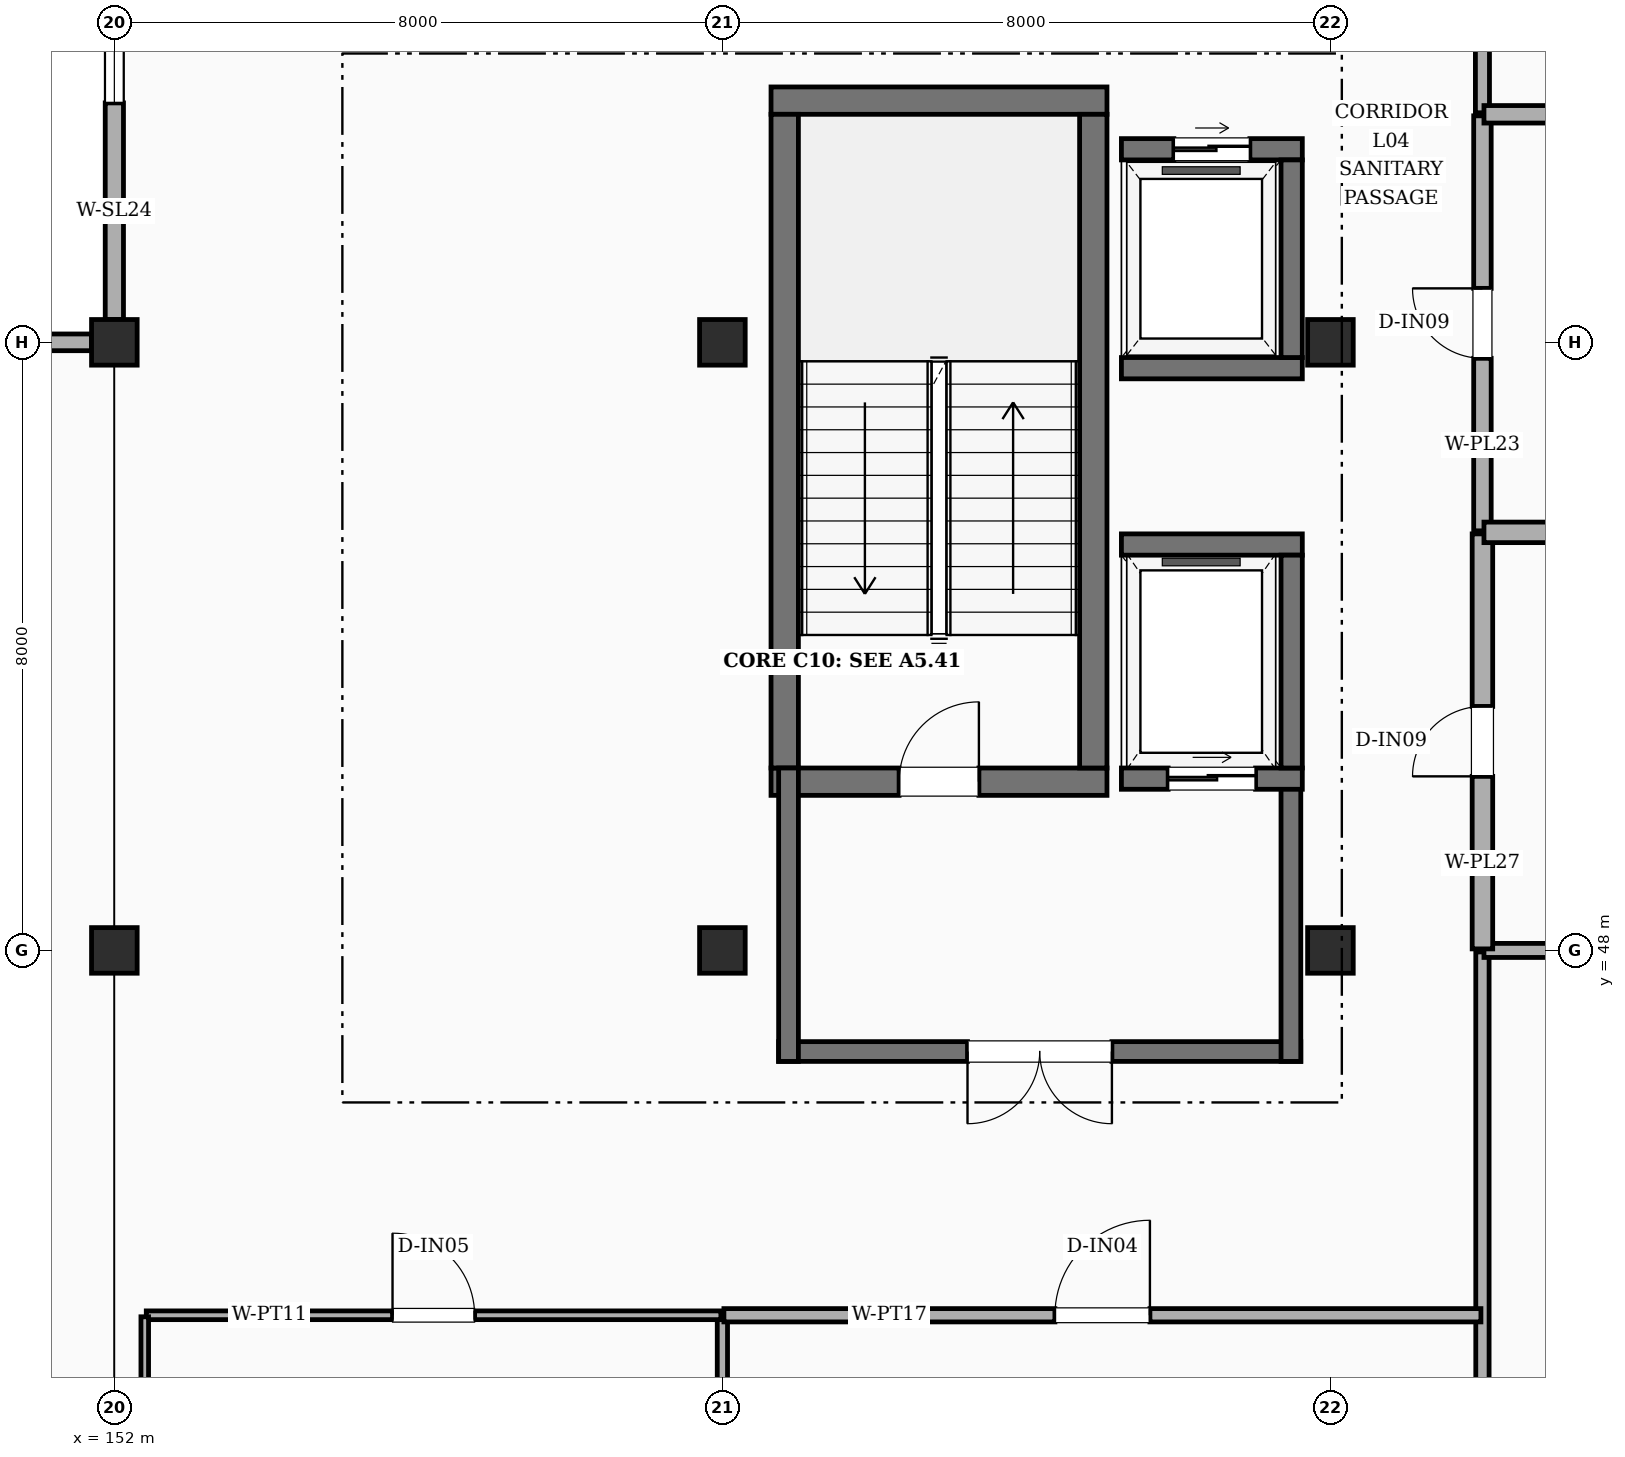
"""IFC4 building model, lengths in metres.
Left out: names, types, materials, properties, quantities, classifications, styles, units other than length and angle.
Written with IfcOpenShell. Run it as: python <this file> out.ifc"""

import sys

from ifc_helpers import new_model, si_unit, direction, frame, frame_2d, origin, origin_2d, place, context, subcontext, project, spatial, rectangle, extrude, element, fill, save


model = new_model("IFC4")
c1 = context("Model", 3, precision=1e-05, world=origin(), true_north=direction((0.0, 1.0)))
c2 = subcontext(c1, "Body", "Model", "MODEL_VIEW")
j1 = project(units=[si_unit("LENGTHUNIT", "METRE"), si_unit("PLANEANGLEUNIT", "RADIAN")], contexts=[c1])
p1 = place(None, origin())
s1 = spatial("IfcSite", under=j1, at=p1, CompositionType="ELEMENT")
p2 = place(p1, origin())
s2 = spatial("IfcBuilding", under=s1, at=p2, CompositionType="ELEMENT")
p3 = place(p2, frame((0.0, 0.0, 19.2)))
s3 = spatial("IfcBuildingStorey", under=s2, at=p3, CompositionType="ELEMENT", Elevation=19.2)
for number, where, z_axis, x_axis in (
    (1, (152.0, 48.0, 0.0), (0.0, 0.0, 1.0), (1.0, 0.0, 0.0)),
    (2, (152.0, 56.0, 0.0), (0.0, 0.0, 1.0), (1.0, 0.0, 0.0)),
    (3, (160.0, 48.0, 0.0), (0.0, 0.0, 1.0), (1.0, 0.0, 0.0)),
    (4, (160.0, 56.0, 0.0), (0.0, 0.0, 1.0), (1.0, 0.0, 0.0)),
    (5, (168.0, 48.0, 0.0), (0.0, 0.0, 1.0), (1.0, 0.0, 0.0)),
    (6, (168.0, 56.0, 0.0), (0.0, 0.0, 1.0), (1.0, 0.0, 0.0)),
):
    element("IfcColumn", number, at=place(p3, frame(where, z_axis=z_axis, x_axis=x_axis)), inside=s3, PredefinedType="COLUMN", context=c2, shape_type="SweptSolid", body=[
        extrude(rectangle(XDim=0.6, YDim=0.6, at=origin_2d()), origin(), (0.0, 0.0, 1.0), 4.2),
    ])
p4 = place(p3, frame((152.0, 63.7, 0.0), z_axis=(0.0, 0.0, 1.0), x_axis=(0.0, -1.0, 0.0)))
e7 = element("IfcWall", 7, at=p4, inside=s3, PredefinedType="SOLIDWALL", context=c2, shape_type="SweptSolid", body=[
    extrude(rectangle(XDim=7.4, YDim=0.24, at=frame_2d((3.7, 0.0))), origin(), (0.0, 0.0, 1.0), 3.37),
])
p5 = place(p4, frame((2.85, 0.0, 0.95)))
e8 = element("IfcOpeningElement", 8, at=p5, cuts=e7, PredefinedType="OPENING", context=c2, shape_type="SweptSolid", body=[
    extrude(rectangle(XDim=1.7, YDim=1.65, at=frame_2d((0.85, 0.825))), frame((0.0, 0.13, 0.0), z_axis=(0.0, -1.0, 0.0), x_axis=(1.0, 0.0, 0.0)), (0.0, 0.0, 1.0), 0.26),
])
p6 = place(p3, frame((151.7, 56.0, 0.0), z_axis=(0.0, 0.0, 1.0), x_axis=(-1.0, 0.0, 0.0)))
e9 = element("IfcWall", 9, at=p6, inside=s3, PredefinedType="SOLIDWALL", context=c2, shape_type="SweptSolid", body=[
    extrude(rectangle(XDim=7.4, YDim=0.22, at=frame_2d((3.7, 0.0))), origin(), (0.0, 0.0, 1.0), 3.96),
])
p7 = place(p6, frame((2.525, 0.0, 0.95)))
e10 = element("IfcOpeningElement", 10, at=p7, cuts=e9, PredefinedType="OPENING", context=c2, shape_type="SweptSolid", body=[
    extrude(rectangle(XDim=2.35, YDim=1.65, at=frame_2d((1.175, 0.825))), frame((0.0, 0.12, 0.0), z_axis=(0.0, -1.0, 0.0), x_axis=(1.0, 0.0, 0.0)), (0.0, 0.0, 1.0), 0.24),
])
p8 = place(p3, frame((160.64, 50.22, 0.0), z_axis=(0.0, 0.0, 1.0), x_axis=(1.0, 0.0, 0.0)))
e11 = element("IfcWall", 11, at=p8, inside=s3, PredefinedType="SHEAR", context=c2, shape_type="SweptSolid", body=[
    extrude(rectangle(XDim=4.42, YDim=0.36, at=frame_2d((2.21, 0.0))), origin(), (0.0, 0.0, 1.0), 4.2),
])
p9 = place(p8, frame((1.685, 0.0, 0.0)))
e12 = element("IfcOpeningElement", 12, at=p9, cuts=e11, PredefinedType="OPENING", context=c2, shape_type="SweptSolid", body=[
    extrude(rectangle(XDim=1.05, YDim=2.15, at=frame_2d((0.525, 1.075))), frame((0.0, 0.19, 0.0), z_axis=(0.0, -1.0, 0.0), x_axis=(1.0, 0.0, 0.0)), (0.0, 0.0, 1.0), 0.38),
])
p10 = place(p3, frame((160.64, 59.18, 0.0), z_axis=(0.0, 0.0, 1.0), x_axis=(1.0, 0.0, 0.0)))
e13 = element("IfcWall", 13, at=p10, inside=s3, PredefinedType="SHEAR", context=c2, shape_type="SweptSolid", body=[
    extrude(rectangle(XDim=4.42, YDim=0.36, at=frame_2d((2.21, 0.0))), origin(), (0.0, 0.0, 1.0), 4.2),
])
for number, where, z_axis, x_axis in (
    (14, (160.82, 50.4, 0.0), (0.0, 0.0, 1.0), (0.0, 1.0, 0.0)),
    (15, (164.88, 50.4, 0.0), (0.0, 0.0, 1.0), (0.0, 1.0, 0.0)),
):
    element("IfcWall", number, at=place(p3, frame(where, z_axis=z_axis, x_axis=x_axis)), inside=s3, PredefinedType="SHEAR", context=c2, shape_type="SweptSolid", body=[
        extrude(rectangle(XDim=8.6, YDim=0.36, at=frame_2d((4.3, 0.0))), origin(), (0.0, 0.0, 1.0), 4.2),
    ])
p11 = place(p3, frame((167.61, 46.67, 0.0), z_axis=(0.0, 0.0, 1.0), x_axis=(-1.0, 0.0, 0.0)))
e16 = element("IfcWall", 16, at=p11, inside=s3, PredefinedType="SHEAR", context=c2, shape_type="SweptSolid", body=[
    extrude(rectangle(XDim=6.87, YDim=0.26, at=frame_2d((3.435, 0.0))), origin(), (0.0, 0.0, 1.0), 4.2),
])
p12 = place(p11, frame((2.485, 0.0, 0.0)))
e17 = element("IfcOpeningElement", 17, at=p12, cuts=e16, PredefinedType="OPENING", context=c2, shape_type="SweptSolid", body=[
    extrude(rectangle(XDim=1.9, YDim=2.25, at=frame_2d((0.95, 1.125))), frame((0.0, 0.14, 0.0), z_axis=(0.0, -1.0, 0.0), x_axis=(1.0, 0.0, 0.0)), (0.0, 0.0, 1.0), 0.28),
])
for number, where, z_axis, x_axis in (
    (18, (160.87, 46.54, 0.0), (0.0, 0.0, 1.0), (0.0, 1.0, 0.0)),
    (19, (167.48, 46.54, 0.0), (0.0, 0.0, 1.0), (0.0, 1.0, 0.0)),
):
    element("IfcWall", number, at=place(p3, frame(where, z_axis=z_axis, x_axis=x_axis)), inside=s3, PredefinedType="SHEAR", context=c2, shape_type="SweptSolid", body=[
        extrude(rectangle(XDim=3.86, YDim=0.26, at=frame_2d((1.93, 0.0))), origin(), (0.0, 0.0, 1.0), 4.2),
    ])
p13 = place(p3, frame((165.25, 50.26, 0.0), z_axis=(0.0, 0.0, 1.0), x_axis=(1.0, 0.0, 0.0)))
e20 = element("IfcWall", 20, at=p13, inside=s3, PredefinedType="SHEAR", context=c2, shape_type="SweptSolid", body=[
    extrude(rectangle(XDim=2.38, YDim=0.28, at=frame_2d((1.19, 0.0))), origin(), (0.0, 0.0, 1.0), 4.2),
])
p14 = place(p13, frame((0.615, 0.0, 0.0)))
e21 = element("IfcOpeningElement", 21, at=p14, cuts=e20, PredefinedType="OPENING", context=c2, shape_type="SweptSolid", body=[
    extrude(rectangle(XDim=1.15, YDim=2.2, at=frame_2d((0.575, 1.1))), frame((0.0, 0.15, 0.0), z_axis=(0.0, -1.0, 0.0), x_axis=(1.0, 0.0, 0.0)), (0.0, 0.0, 1.0), 0.3),
])
p15 = place(p3, frame((165.25, 53.34, 0.0), z_axis=(0.0, 0.0, 1.0), x_axis=(1.0, 0.0, 0.0)))
e22 = element("IfcWall", 22, at=p15, inside=s3, PredefinedType="SHEAR", context=c2, shape_type="SweptSolid", body=[
    extrude(rectangle(XDim=2.38, YDim=0.28, at=frame_2d((1.19, 0.0))), origin(), (0.0, 0.0, 1.0), 4.2),
])
p16 = place(p3, frame((167.49, 50.4, 0.0), z_axis=(0.0, 0.0, 1.0), x_axis=(0.0, 1.0, 0.0)))
e23 = element("IfcWall", 23, at=p16, inside=s3, PredefinedType="SHEAR", context=c2, shape_type="SweptSolid", body=[
    extrude(rectangle(XDim=2.8, YDim=0.28, at=frame_2d((1.4, 0.0))), origin(), (0.0, 0.0, 1.0), 4.2),
])
p17 = place(p3, frame((165.25, 55.66, 0.0), z_axis=(0.0, 0.0, 1.0), x_axis=(1.0, 0.0, 0.0)))
e24 = element("IfcWall", 24, at=p17, inside=s3, PredefinedType="SHEAR", context=c2, shape_type="SweptSolid", body=[
    extrude(rectangle(XDim=2.38, YDim=0.28, at=frame_2d((1.19, 0.0))), origin(), (0.0, 0.0, 1.0), 4.2),
])
p18 = place(p3, frame((165.25, 58.54, 0.0), z_axis=(0.0, 0.0, 1.0), x_axis=(1.0, 0.0, 0.0)))
e25 = element("IfcWall", 25, at=p18, inside=s3, PredefinedType="SHEAR", context=c2, shape_type="SweptSolid", body=[
    extrude(rectangle(XDim=2.38, YDim=0.28, at=frame_2d((1.19, 0.0))), origin(), (0.0, 0.0, 1.0), 4.2),
])
p19 = place(p18, frame((0.69, 0.0, 0.0)))
e26 = element("IfcOpeningElement", 26, at=p19, cuts=e25, PredefinedType="OPENING", context=c2, shape_type="SweptSolid", body=[
    extrude(rectangle(XDim=1.0, YDim=2.15, at=frame_2d((0.5, 1.075))), frame((0.0, 0.15, 0.0), z_axis=(0.0, -1.0, 0.0), x_axis=(1.0, 0.0, 0.0)), (0.0, 0.0, 1.0), 0.3),
])
p20 = place(p3, frame((167.49, 55.8, 0.0), z_axis=(0.0, 0.0, 1.0), x_axis=(0.0, 1.0, 0.0)))
e27 = element("IfcWall", 27, at=p20, inside=s3, PredefinedType="SHEAR", context=c2, shape_type="SweptSolid", body=[
    extrude(rectangle(XDim=2.6, YDim=0.28, at=frame_2d((1.3, 0.0))), origin(), (0.0, 0.0, 1.0), 4.2),
])
p21 = place(p3, frame((160.0, 24.02, 0.0), z_axis=(0.0, 0.0, 1.0), x_axis=(0.0, 1.0, 0.0)))
e28 = element("IfcWall", 28, at=p21, inside=s3, PredefinedType="PARTITIONING", context=c2, shape_type="SweptSolid", body=[
    extrude(rectangle(XDim=19.16, YDim=0.135, at=frame_2d((9.58, 0.0))), origin(), (0.0, 0.0, 1.0), 3.37),
])
p22 = place(p3, frame((152.42, 43.2, 0.0), z_axis=(0.0, 0.0, 1.0), x_axis=(1.0, 0.0, 0.0)))
e29 = element("IfcWall", 29, at=p22, inside=s3, PredefinedType="PARTITIONING", context=c2, shape_type="SweptSolid", body=[
    extrude(rectangle(XDim=7.56, YDim=0.115, at=frame_2d((3.78, 0.0))), origin(), (0.0, 0.0, 1.0), 3.37),
])
p23 = place(p22, frame((3.24, 0.0, 0.0)))
e30 = element("IfcOpeningElement", 30, at=p23, cuts=e29, PredefinedType="OPENING", context=c2, shape_type="SweptSolid", body=[
    extrude(rectangle(XDim=1.08, YDim=2.15, at=frame_2d((0.54, 1.075))), frame((0.0, 0.067, 0.0), z_axis=(0.0, -1.0, 0.0), x_axis=(1.0, 0.0, 0.0)), (0.0, 0.0, 1.0), 0.135),
])
p24 = place(p3, frame((152.4, 38.02, 0.0), z_axis=(0.0, 0.0, 1.0), x_axis=(0.0, 1.0, 0.0)))
e31 = element("IfcWall", 31, at=p24, inside=s3, PredefinedType="PARTITIONING", context=c2, shape_type="SweptSolid", body=[
    extrude(rectangle(XDim=5.16, YDim=0.1, at=frame_2d((2.58, 0.0))), origin(), (0.0, 0.0, 1.0), 3.37),
])
p25 = place(p3, frame((170.0, 24.02, 0.0), z_axis=(0.0, 0.0, 1.0), x_axis=(0.0, 1.0, 0.0)))
e32 = element("IfcWall", 32, at=p25, inside=s3, PredefinedType="PARTITIONING", context=c2, shape_type="SweptSolid", body=[
    extrude(rectangle(XDim=23.96, YDim=0.175, at=frame_2d((11.98, 0.0))), origin(), (0.0, 0.0, 1.0), 3.37),
])
p26 = place(p25, frame((11.44, 0.0, 0.0)))
e33 = element("IfcOpeningElement", 33, at=p26, cuts=e32, PredefinedType="OPENING", context=c2, shape_type="SweptSolid", body=[
    extrude(rectangle(XDim=1.08, YDim=2.15, at=frame_2d((0.54, 1.075))), frame((0.0, 0.097, 0.0), z_axis=(0.0, -1.0, 0.0), x_axis=(1.0, 0.0, 0.0)), (0.0, 0.0, 1.0), 0.195),
])
p27 = place(p3, frame((170.02, 48.0, 0.0), z_axis=(0.0, 0.0, 1.0), x_axis=(1.0, 0.0, 0.0)))
e34 = element("IfcWall", 34, at=p27, inside=s3, PredefinedType="PLUMBINGWALL", context=c2, shape_type="SweptSolid", body=[
    extrude(rectangle(XDim=5.86, YDim=0.185, at=frame_2d((2.93, 0.0))), origin(), (0.0, 0.0, 1.0), 3.37),
])
p28 = place(p3, frame((170.0, 48.02, 0.0), z_axis=(0.0, 0.0, 1.0), x_axis=(0.0, 1.0, 0.0)))
e35 = element("IfcWall", 35, at=p28, inside=s3, PredefinedType="PLUMBINGWALL", context=c2, shape_type="SweptSolid", body=[
    extrude(rectangle(XDim=5.46, YDim=0.27, at=frame_2d((2.73, 0.0))), origin(), (0.0, 0.0, 1.0), 3.37),
])
p29 = place(p28, frame((2.27, 0.0, 0.0)))
e36 = element("IfcOpeningElement", 36, at=p29, cuts=e35, PredefinedType="OPENING", context=c2, shape_type="SweptSolid", body=[
    extrude(rectangle(XDim=0.92, YDim=2.1, at=frame_2d((0.46, 1.05))), frame((0.0, 0.145, 0.0), z_axis=(0.0, -1.0, 0.0), x_axis=(1.0, 0.0, 0.0)), (0.0, 0.0, 1.0), 0.29),
])
p30 = place(p3, frame((170.0, 53.52, 0.0), z_axis=(0.0, 0.0, 1.0), x_axis=(0.0, 1.0, 0.0)))
e37 = element("IfcWall", 37, at=p30, inside=s3, PredefinedType="PLUMBINGWALL", context=c2, shape_type="SweptSolid", body=[
    extrude(rectangle(XDim=5.46, YDim=0.23, at=frame_2d((2.73, 0.0))), origin(), (0.0, 0.0, 1.0), 3.37),
])
p31 = place(p30, frame((2.27, 0.0, 0.0)))
e38 = element("IfcOpeningElement", 38, at=p31, cuts=e37, PredefinedType="OPENING", context=c2, shape_type="SweptSolid", body=[
    extrude(rectangle(XDim=0.92, YDim=2.1, at=frame_2d((0.46, 1.05))), frame((0.0, 0.125, 0.0), z_axis=(0.0, -1.0, 0.0), x_axis=(1.0, 0.0, 0.0)), (0.0, 0.0, 1.0), 0.25),
])
p32 = place(p3, frame((170.0, 59.02, 0.0), z_axis=(0.0, 0.0, 1.0), x_axis=(0.0, 1.0, 0.0)))
e39 = element("IfcWall", 39, at=p32, inside=s3, PredefinedType="PLUMBINGWALL", context=c2, shape_type="SweptSolid", body=[
    extrude(rectangle(XDim=4.86, YDim=0.185, at=frame_2d((2.43, 0.0))), origin(), (0.0, 0.0, 1.0), 3.37),
])
p33 = place(p32, frame((1.95, 0.0, 0.0)))
e40 = element("IfcOpeningElement", 40, at=p33, cuts=e39, PredefinedType="OPENING", context=c2, shape_type="SweptSolid", body=[
    extrude(rectangle(XDim=0.96, YDim=2.1, at=frame_2d((0.48, 1.05))), frame((0.0, 0.103, 0.0), z_axis=(0.0, -1.0, 0.0), x_axis=(1.0, 0.0, 0.0)), (0.0, 0.0, 1.0), 0.205),
])
p34 = place(p3, frame((170.02, 53.5, 0.0), z_axis=(0.0, 0.0, 1.0), x_axis=(1.0, 0.0, 0.0)))
e41 = element("IfcWall", 41, at=p34, inside=s3, PredefinedType="PLUMBINGWALL", context=c2, shape_type="SweptSolid", body=[
    extrude(rectangle(XDim=5.86, YDim=0.27, at=frame_2d((2.93, 0.0))), origin(), (0.0, 0.0, 1.0), 3.57),
])
p35 = place(p3, frame((170.02, 59.0, 0.0), z_axis=(0.0, 0.0, 1.0), x_axis=(1.0, 0.0, 0.0)))
e42 = element("IfcWall", 42, at=p35, inside=s3, PredefinedType="PLUMBINGWALL", context=c2, shape_type="SweptSolid", body=[
    extrude(rectangle(XDim=5.86, YDim=0.23, at=frame_2d((2.93, 0.0))), origin(), (0.0, 0.0, 1.0), 3.57),
])
p36 = place(p3, frame((160.02, 43.2, 0.0), z_axis=(0.0, 0.0, 1.0), x_axis=(1.0, 0.0, 0.0)))
e43 = element("IfcWall", 43, at=p36, inside=s3, PredefinedType="PARTITIONING", context=c2, shape_type="SweptSolid", body=[
    extrude(rectangle(XDim=9.96, YDim=0.175, at=frame_2d((4.98, 0.0))), origin(), (0.0, 0.0, 1.0), 3.37),
])
p37 = place(p36, frame((4.355, 0.0, 0.0)))
e44 = element("IfcOpeningElement", 44, at=p37, cuts=e43, PredefinedType="OPENING", context=c2, shape_type="SweptSolid", body=[
    extrude(rectangle(XDim=1.25, YDim=2.15, at=frame_2d((0.625, 1.075))), frame((0.0, 0.097, 0.0), z_axis=(0.0, -1.0, 0.0), x_axis=(1.0, 0.0, 0.0)), (0.0, 0.0, 1.0), 0.195),
])
p38 = place(p5, origin())
e45 = element("IfcWindow", 45, at=p38, inside=s3, PartitioningType="SINGLE_PANEL", PredefinedType="WINDOW", context=c2, shape_type="SweptSolid", body=[
    extrude(rectangle(XDim=1.7, YDim=1.65, at=frame_2d((0.85, 0.825))), frame((0.0, 0.03, 0.0), z_axis=(0.0, -1.0, 0.0), x_axis=(1.0, 0.0, 0.0)), (0.0, 0.0, 1.0), 0.06),
])
fill(e8, e45)
p39 = place(p9, origin())
e46 = element("IfcDoor", 46, at=p39, inside=s3, OperationType="SINGLE_SWING_RIGHT", PredefinedType="DOOR", context=c2, shape_type="SweptSolid", body=[
    extrude(rectangle(XDim=1.05, YDim=2.15, at=frame_2d((0.525, 1.075))), frame((0.0, 0.025, 0.0), z_axis=(0.0, -1.0, 0.0), x_axis=(1.0, 0.0, 0.0)), (0.0, 0.0, 1.0), 0.05),
])
fill(e12, e46)
p40 = place(p12, origin())
e47 = element("IfcDoor", 47, at=p40, inside=s3, OperationType="DOUBLE_DOOR_SINGLE_SWING", PredefinedType="DOOR", context=c2, shape_type="SweptSolid", body=[
    extrude(rectangle(XDim=1.9, YDim=2.25, at=frame_2d((0.95, 1.125))), frame((0.0, 0.025, 0.0), z_axis=(0.0, -1.0, 0.0), x_axis=(1.0, 0.0, 0.0)), (0.0, 0.0, 1.0), 0.05),
])
fill(e17, e47)
p41 = place(p14, origin())
e48 = element("IfcDoor", 48, at=p41, inside=s3, OperationType="SLIDING_TO_LEFT", PredefinedType="DOOR", context=c2, shape_type="SweptSolid", body=[
    extrude(rectangle(XDim=1.15, YDim=2.2, at=frame_2d((0.575, 1.1))), frame((0.0, 0.025, 0.0), z_axis=(0.0, -1.0, 0.0), x_axis=(1.0, 0.0, 0.0)), (0.0, 0.0, 1.0), 0.05),
])
fill(e21, e48)
p42 = place(p19, origin())
e49 = element("IfcDoor", 49, at=p42, inside=s3, OperationType="SLIDING_TO_LEFT", PredefinedType="DOOR", context=c2, shape_type="SweptSolid", body=[
    extrude(rectangle(XDim=1.0, YDim=2.15, at=frame_2d((0.5, 1.075))), frame((0.0, 0.025, 0.0), z_axis=(0.0, -1.0, 0.0), x_axis=(1.0, 0.0, 0.0)), (0.0, 0.0, 1.0), 0.05),
])
fill(e26, e49)
p43 = place(p23, origin())
e50 = element("IfcDoor", 50, at=p43, inside=s3, OperationType="SINGLE_SWING_LEFT", PredefinedType="DOOR", context=c2, shape_type="SweptSolid", body=[
    extrude(rectangle(XDim=1.08, YDim=2.15, at=frame_2d((0.54, 1.075))), frame((0.0, 0.025, 0.0), z_axis=(0.0, -1.0, 0.0), x_axis=(1.0, 0.0, 0.0)), (0.0, 0.0, 1.0), 0.05),
])
fill(e30, e50)
p44 = place(p29, origin())
e51 = element("IfcDoor", 51, at=p44, inside=s3, OperationType="SINGLE_SWING_LEFT", PredefinedType="DOOR", context=c2, shape_type="SweptSolid", body=[
    extrude(rectangle(XDim=0.92, YDim=2.1, at=frame_2d((0.46, 1.05))), frame((0.0, 0.025, 0.0), z_axis=(0.0, -1.0, 0.0), x_axis=(1.0, 0.0, 0.0)), (0.0, 0.0, 1.0), 0.05),
])
fill(e36, e51)
p45 = place(p31, origin())
e52 = element("IfcDoor", 52, at=p45, inside=s3, OperationType="SINGLE_SWING_RIGHT", PredefinedType="DOOR", context=c2, shape_type="SweptSolid", body=[
    extrude(rectangle(XDim=0.92, YDim=2.1, at=frame_2d((0.46, 1.05))), frame((0.0, 0.025, 0.0), z_axis=(0.0, -1.0, 0.0), x_axis=(1.0, 0.0, 0.0)), (0.0, 0.0, 1.0), 0.05),
])
fill(e38, e52)
p46 = place(p37, origin())
e53 = element("IfcDoor", 53, at=p46, inside=s3, OperationType="SINGLE_SWING_RIGHT", PredefinedType="DOOR", context=c2, shape_type="SweptSolid", body=[
    extrude(rectangle(XDim=1.25, YDim=2.15, at=frame_2d((0.625, 1.075))), frame((0.0, 0.025, 0.0), z_axis=(0.0, -1.0, 0.0), x_axis=(1.0, 0.0, 0.0)), (0.0, 0.0, 1.0), 0.05),
])
fill(e44, e53)
save(model, sys.argv[1])
